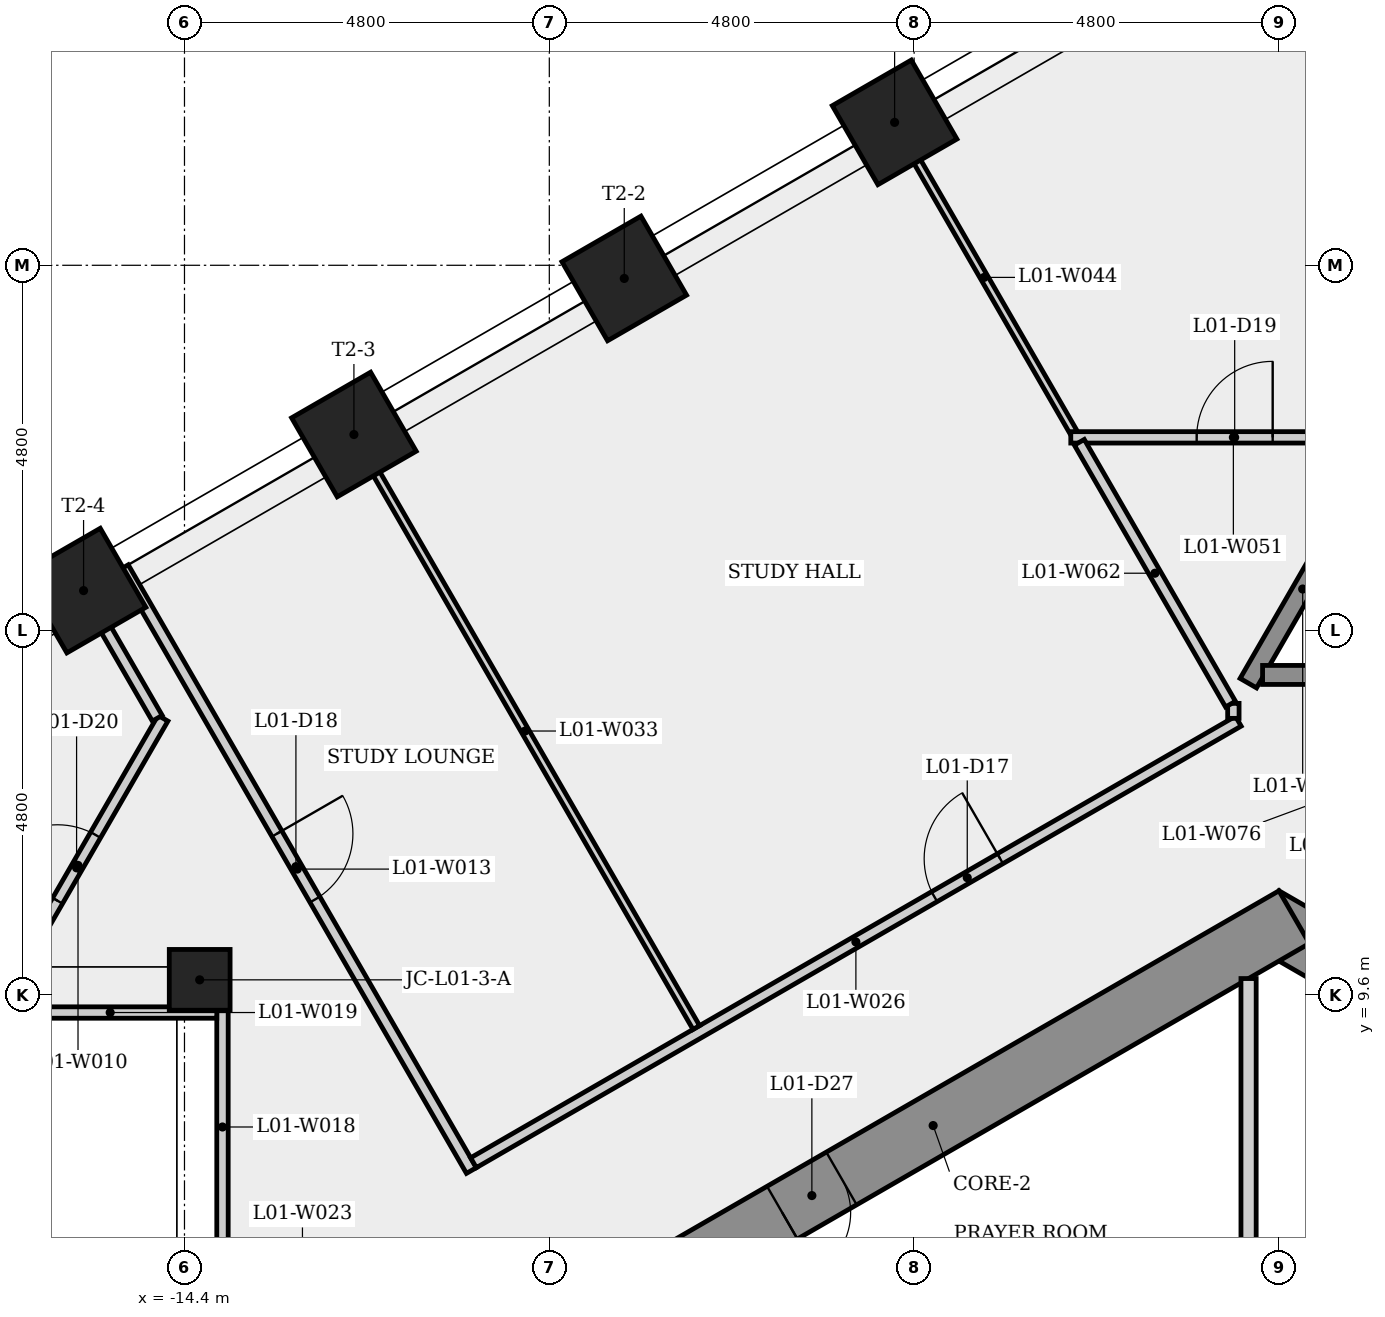
"""IFC4 building model, lengths in metres.
Left out: names, types, materials, properties, quantities, classifications, styles, units other than length and angle.
Written with IfcOpenShell. Run it as: python <this file> out.ifc"""

import sys

from ifc_helpers import new_model, si_unit, direction, frame, frame_2d, origin, origin_2d, place, context, subcontext, project, spatial, rectangle, extrude, element, fill, save


model = new_model("IFC4")
c1 = context("Model", 3, precision=1e-05, world=origin(), true_north=direction((0.0, 1.0)))
c2 = subcontext(c1, "Body", "Model", "MODEL_VIEW")
j1 = project(units=[si_unit("LENGTHUNIT", "METRE"), si_unit("PLANEANGLEUNIT", "RADIAN")], contexts=[c1])
p1 = place(None, origin())
s1 = spatial("IfcSite", under=j1, at=p1, CompositionType="ELEMENT")
p2 = place(p1, origin())
s2 = spatial("IfcBuilding", under=s1, at=p2, CompositionType="ELEMENT")
p3 = place(p2, frame((0.0, 0.0, 7.0)))
s3 = spatial("IfcBuildingStorey", under=s2, at=p3, CompositionType="ELEMENT", Elevation=7.0)
p4 = place(p3, frame((9.3, 5.138, 0.0), z_axis=(0.0, 0.0, 1.0), x_axis=(-0.866023993627, 0.500002442456, 0.0)))
e1 = element("IfcWall", 1, at=p4, inside=s3, PredefinedType="SHEAR", context=c2, shape_type="SweptSolid", body=[
    extrude(rectangle(XDim=10.97, YDim=0.8, at=frame_2d((5.485, 0.0))), origin(), (0.0, 0.0, 1.0), 4.5),
])
p5 = place(p4, frame((8.21, 0.0, 0.0)))
e2 = element("IfcOpeningElement", 2, at=p5, cuts=e1, PredefinedType="OPENING", context=c2, shape_type="SweptSolid", body=[
    extrude(rectangle(XDim=0.9, YDim=2.1, at=frame_2d((0.45, 1.05))), frame((0.0, 0.41, 0.0), z_axis=(0.0, -1.0, 0.0), x_axis=(1.0, 0.0, 0.0)), (0.0, 0.0, 1.0), 0.82),
])
p6 = place(p4, frame((2.126, 0.0, 0.0)))
e3 = element("IfcOpeningElement", 3, at=p6, cuts=e1, PredefinedType="OPENING", context=c2, shape_type="SweptSolid", body=[
    extrude(rectangle(XDim=0.9, YDim=2.1, at=frame_2d((0.45, 1.05))), frame((0.0, 0.41, 0.0), z_axis=(0.0, -1.0, 0.0), x_axis=(1.0, 0.0, 0.0)), (0.0, 0.0, 1.0), 0.82),
])
p7 = place(p3, frame((0.2, 10.623, 0.0), z_axis=(0.0, 0.0, 1.0), x_axis=(-0.866023993627, -0.500002442456, 0.0)))
e4 = element("IfcWall", 4, at=p7, inside=s3, PredefinedType="SHEAR", context=c2, shape_type="SweptSolid", body=[
    extrude(rectangle(XDim=10.97, YDim=0.8, at=frame_2d((5.485, 0.0))), origin(), (0.0, 0.0, 1.0), 4.5),
])
p8 = place(p7, frame((6.877, 0.0, 0.0)))
e5 = element("IfcOpeningElement", 5, at=p8, cuts=e4, PredefinedType="OPENING", context=c2, shape_type="SweptSolid", body=[
    extrude(rectangle(XDim=0.9, YDim=2.1, at=frame_2d((0.45, 1.05))), frame((0.0, 0.41, 0.0), z_axis=(0.0, -1.0, 0.0), x_axis=(1.0, 0.0, 0.0)), (0.0, 0.0, 1.0), 0.82),
])
for number, where, z_axis, x_axis in (
    (6, (-5.057, 21.08, 0.0), (0.0, 0.0, 1.0), (-0.5, 0.866, 0.0)),
    (7, (-8.614, 19.027, 0.0), (0.0, 0.0, 1.0), (-0.5, 0.866, 0.0)),
    (8, (-12.171, 16.973, 0.0), (0.0, 0.0, 1.0), (-0.5, 0.866, 0.0)),
    (9, (-15.728, 14.92, 0.0), (0.0, 0.0, 1.0), (-0.5, 0.866, 0.0)),
):
    element("IfcColumn", number, at=place(p3, frame(where, z_axis=z_axis, x_axis=x_axis)), inside=s3, PredefinedType="COLUMN", context=c2, shape_type="SweptSolid", body=[
        extrude(rectangle(XDim=1.2, YDim=1.2, at=origin_2d()), origin(), (0.0, 0.0, 1.0), 4.5),
    ])
p9 = place(p3, frame((-14.2, 9.798, 0.0), z_axis=(0.0, 0.0, 1.0), x_axis=(-1.0, 0.0, 0.0)))
e10 = element("IfcColumn", 10, at=p9, inside=s3, PredefinedType="COLUMN", context=c2, shape_type="SweptSolid", body=[
    extrude(rectangle(XDim=0.8, YDim=0.8, at=origin_2d()), origin(), (0.0, 0.0, 1.0), 4.5),
])
p10 = place(p3, frame((-16.919, 9.368, 0.0), z_axis=(0.0, 0.0, 1.0), x_axis=(0.500009203373, 0.866020090149, 0.0)))
e11 = element("IfcWall", 11, at=p10, inside=s3, PredefinedType="PARTITIONING", context=c2, shape_type="SweptSolid", body=[
    extrude(rectangle(XDim=4.471, YDim=0.15, at=frame_2d((2.236, 0.0))), origin(), (0.0, 0.0, 1.0), 4.1),
])
p11 = place(p10, frame((1.698, 0.0, 0.0)))
e12 = element("IfcOpeningElement", 12, at=p11, cuts=e11, PredefinedType="OPENING", context=c2, shape_type="SweptSolid", body=[
    extrude(rectangle(XDim=1.0, YDim=2.1, at=frame_2d((0.5, 1.05))), frame((0.0, 0.085, 0.0), z_axis=(0.0, -1.0, 0.0), x_axis=(1.0, 0.0, 0.0)), (0.0, 0.0, 1.0), 0.17),
])
p12 = place(p3, frame((-15.205, 15.221, 0.0), z_axis=(0.0, 0.0, 1.0), x_axis=(0.500006245143, -0.86602179812, 0.0)))
e13 = element("IfcWall", 13, at=p12, inside=s3, PredefinedType="PARTITIONING", context=c2, shape_type="SweptSolid", body=[
    extrude(rectangle(XDim=9.16, YDim=0.15, at=frame_2d((4.58, 0.0))), origin(), (0.0, 0.0, 1.0), 4.1),
])
p13 = place(p12, frame((4.042, 0.0, 0.0)))
e14 = element("IfcOpeningElement", 14, at=p13, cuts=e13, PredefinedType="OPENING", context=c2, shape_type="SweptSolid", body=[
    extrude(rectangle(XDim=1.0, YDim=2.1, at=frame_2d((0.5, 1.05))), frame((0.0, 0.085, 0.0), z_axis=(0.0, -1.0, 0.0), x_axis=(1.0, 0.0, 0.0)), (0.0, 0.0, 1.0), 0.17),
])
p14 = place(p3, frame((-14.758, 13.24, 0.0), z_axis=(0.0, 0.0, 1.0), x_axis=(-0.49998396455, 0.866034661658, 0.0)))
e15 = element("IfcWall", 15, at=p14, inside=s3, PredefinedType="PARTITIONING", context=c2, shape_type="SweptSolid", body=[
    extrude(rectangle(XDim=1.939, YDim=0.15, at=frame_2d((0.97, 0.0))), origin(), (0.0, 0.0, 1.0), 4.1),
])
p15 = place(p3, frame((-13.9, 6.281, 0.0), z_axis=(0.0, 0.0, 1.0), x_axis=(0.0, 1.0, 0.0)))
e16 = element("IfcWall", 16, at=p15, inside=s3, PredefinedType="PARTITIONING", context=c2, shape_type="SweptSolid", body=[
    extrude(rectangle(XDim=3.162, YDim=0.15, at=frame_2d((1.581, 0.0))), origin(), (0.0, 0.0, 1.0), 3.175),
])
p16 = place(p3, frame((-13.975, 9.368, 0.0), z_axis=(0.0, 0.0, 1.0), x_axis=(-1.0, 0.0, 0.0)))
e17 = element("IfcWall", 17, at=p16, inside=s3, PredefinedType="PARTITIONING", context=c2, shape_type="SweptSolid", body=[
    extrude(rectangle(XDim=2.805, YDim=0.15, at=frame_2d((1.402, 0.0))), origin(), (0.0, 0.0, 1.0), 3.175),
])
p17 = place(p3, frame((-10.598, 7.391, 0.0), z_axis=(0.0, 0.0, 1.0), x_axis=(0.866022183431, 0.500005577774, 0.0)))
e18 = element("IfcWall", 18, at=p17, inside=s3, PredefinedType="PARTITIONING", context=c2, shape_type="SweptSolid", body=[
    extrude(rectangle(XDim=11.619, YDim=0.15, at=frame_2d((5.81, 0.0))), origin(), (0.0, 0.0, 1.0), 4.1),
])
p18 = place(p17, frame((7.001, 0.0, 0.0)))
e19 = element("IfcOpeningElement", 19, at=p18, cuts=e18, PredefinedType="OPENING", context=c2, shape_type="SweptSolid", body=[
    extrude(rectangle(XDim=1.0, YDim=2.1, at=frame_2d((0.5, 1.05))), frame((0.0, 0.085, 0.0), z_axis=(0.0, -1.0, 0.0), x_axis=(1.0, 0.0, 0.0)), (0.0, 0.0, 1.0), 0.17),
])
p19 = place(p3, frame((-7.666, 9.171, 0.0), z_axis=(0.0, 0.0, 1.0), x_axis=(-0.500009404554, 0.866019973994, 0.0)))
e20 = element("IfcWall", 20, at=p19, inside=s3, PredefinedType="PARTITIONING", context=c2, shape_type="SweptSolid", body=[
    extrude(rectangle(XDim=9.01, YDim=0.1, at=frame_2d((4.505, 0.0))), origin(), (0.0, 0.0, 1.0), 4.1),
])
p20 = place(p3, frame((-5.057, 21.08, 0.0), z_axis=(0.0, 0.0, 1.0), x_axis=(0.500018540756, -0.866014699009, 0.0)))
e21 = element("IfcWall", 21, at=p20, inside=s3, PredefinedType="PARTITIONING", context=c2, shape_type="SweptSolid", body=[
    extrude(rectangle(XDim=4.711, YDim=0.1, at=frame_2d((2.355, 0.0))), origin(), (0.0, 0.0, 1.0), 4.1),
])
p21 = place(p3, frame((-2.739, 16.936, 0.0), z_axis=(0.0, 0.0, 1.0), x_axis=(1.0, 0.0, 0.0)))
e22 = element("IfcWall", 22, at=p21, inside=s3, PredefinedType="PARTITIONING", context=c2, shape_type="SweptSolid", body=[
    extrude(rectangle(XDim=4.278, YDim=0.15, at=frame_2d((2.139, 0.0))), origin(), (0.0, 0.0, 1.0), 4.1),
])
p22 = place(p21, frame((1.656, 0.0, 0.0)))
e23 = element("IfcOpeningElement", 23, at=p22, cuts=e22, PredefinedType="OPENING", context=c2, shape_type="SweptSolid", body=[
    extrude(rectangle(XDim=1.0, YDim=2.1, at=frame_2d((0.5, 1.05))), frame((0.0, 0.085, 0.0), z_axis=(0.0, -1.0, 0.0), x_axis=(1.0, 0.0, 0.0)), (0.0, 0.0, 1.0), 0.17),
])
p23 = place(p3, frame((-0.6, 13.239, 0.0), z_axis=(0.0, 0.0, 1.0), x_axis=(0.0, 1.0, 0.0)))
e24 = element("IfcWall", 24, at=p23, inside=s3, PredefinedType="PARTITIONING", context=c2, shape_type="SweptSolid", body=[
    extrude(rectangle(XDim=0.197, YDim=0.15, at=frame_2d((0.099, 0.0))), origin(), (0.0, 0.0, 1.0), 4.1),
])
p24 = place(p3, frame((-0.637, 13.426, 0.0), z_axis=(0.0, 0.0, 1.0), x_axis=(-0.500046503579, 0.865998553266, 0.0)))
e25 = element("IfcWall", 25, at=p24, inside=s3, PredefinedType="PARTITIONING", context=c2, shape_type="SweptSolid", body=[
    extrude(rectangle(XDim=3.978, YDim=0.15, at=frame_2d((1.989, 0.0))), origin(), (0.0, 0.0, 1.0), 4.1),
])
p25 = place(p3, frame((-0.4, 9.815, 0.0), z_axis=(0.0, 0.0, 1.0), x_axis=(0.0, -1.0, 0.0)))
e26 = element("IfcWall", 26, at=p25, inside=s3, PredefinedType="PARTITIONING", context=c2, shape_type="SweptSolid", body=[
    extrude(rectangle(XDim=4.54, YDim=0.2, at=frame_2d((2.27, 0.0))), origin(), (0.0, 0.0, 1.0), 4.1),
])
p26 = place(p3, frame((-0.403, 13.702, 0.0), z_axis=(0.0, 0.0, 1.0), x_axis=(0.499976111731, 0.866039195244, 0.0)))
e27 = element("IfcWall", 27, at=p26, inside=s3, PredefinedType="SHEAR", context=c2, shape_type="SweptSolid", body=[
    extrude(rectangle(XDim=2.861, YDim=0.25, at=frame_2d((1.43, 0.0))), origin(), (0.0, 0.0, 1.0), 4.1),
])
p27 = place(p3, frame((0.475, 13.81, 0.0), z_axis=(0.0, 0.0, 1.0), x_axis=(-1.0, 0.0, 0.0)))
e28 = element("IfcWall", 28, at=p27, inside=s3, PredefinedType="SHEAR", context=c2, shape_type="SweptSolid", body=[
    extrude(rectangle(XDim=0.691, YDim=0.25, at=frame_2d((0.345, 0.0))), origin(), (0.0, 0.0, 1.0), 4.5),
])
p28 = place(p18, origin())
e29 = element("IfcDoor", 29, at=p28, inside=s3, OperationType="SINGLE_SWING_RIGHT", PredefinedType="DOOR", context=c2, shape_type="SweptSolid", body=[
    extrude(rectangle(XDim=1.0, YDim=2.1, at=frame_2d((0.5, 1.05))), frame((0.0, 0.025, 0.0), z_axis=(0.0, -1.0, 0.0), x_axis=(1.0, 0.0, 0.0)), (0.0, 0.0, 1.0), 0.05),
])
fill(e19, e29)
p29 = place(p13, origin())
e30 = element("IfcDoor", 30, at=p29, inside=s3, OperationType="SINGLE_SWING_LEFT", PredefinedType="DOOR", context=c2, shape_type="SweptSolid", body=[
    extrude(rectangle(XDim=1.0, YDim=2.1, at=frame_2d((0.5, 1.05))), frame((0.0, 0.025, 0.0), z_axis=(0.0, -1.0, 0.0), x_axis=(1.0, 0.0, 0.0)), (0.0, 0.0, 1.0), 0.05),
])
fill(e14, e30)
p30 = place(p22, origin())
e31 = element("IfcDoor", 31, at=p30, inside=s3, OperationType="SINGLE_SWING_RIGHT", PredefinedType="DOOR", context=c2, shape_type="SweptSolid", body=[
    extrude(rectangle(XDim=1.0, YDim=2.1, at=frame_2d((0.5, 1.05))), frame((0.0, 0.025, 0.0), z_axis=(0.0, -1.0, 0.0), x_axis=(1.0, 0.0, 0.0)), (0.0, 0.0, 1.0), 0.05),
])
fill(e23, e31)
p31 = place(p11, origin())
e32 = element("IfcDoor", 32, at=p31, inside=s3, OperationType="SINGLE_SWING_LEFT", PredefinedType="DOOR", context=c2, shape_type="SweptSolid", body=[
    extrude(rectangle(XDim=1.0, YDim=2.1, at=frame_2d((0.5, 1.05))), frame((0.0, 0.025, 0.0), z_axis=(0.0, -1.0, 0.0), x_axis=(1.0, 0.0, 0.0)), (0.0, 0.0, 1.0), 0.05),
])
fill(e12, e32)
p32 = place(p8, origin())
e33 = element("IfcDoor", 33, at=p32, inside=s3, OperationType="SINGLE_SWING_RIGHT", PredefinedType="DOOR", context=c2, shape_type="SweptSolid", body=[
    extrude(rectangle(XDim=0.9, YDim=2.1, at=frame_2d((0.45, 1.05))), frame((0.0, 0.025, 0.0), z_axis=(0.0, -1.0, 0.0), x_axis=(1.0, 0.0, 0.0)), (0.0, 0.0, 1.0), 0.05),
])
fill(e5, e33)
save(model, sys.argv[1])
